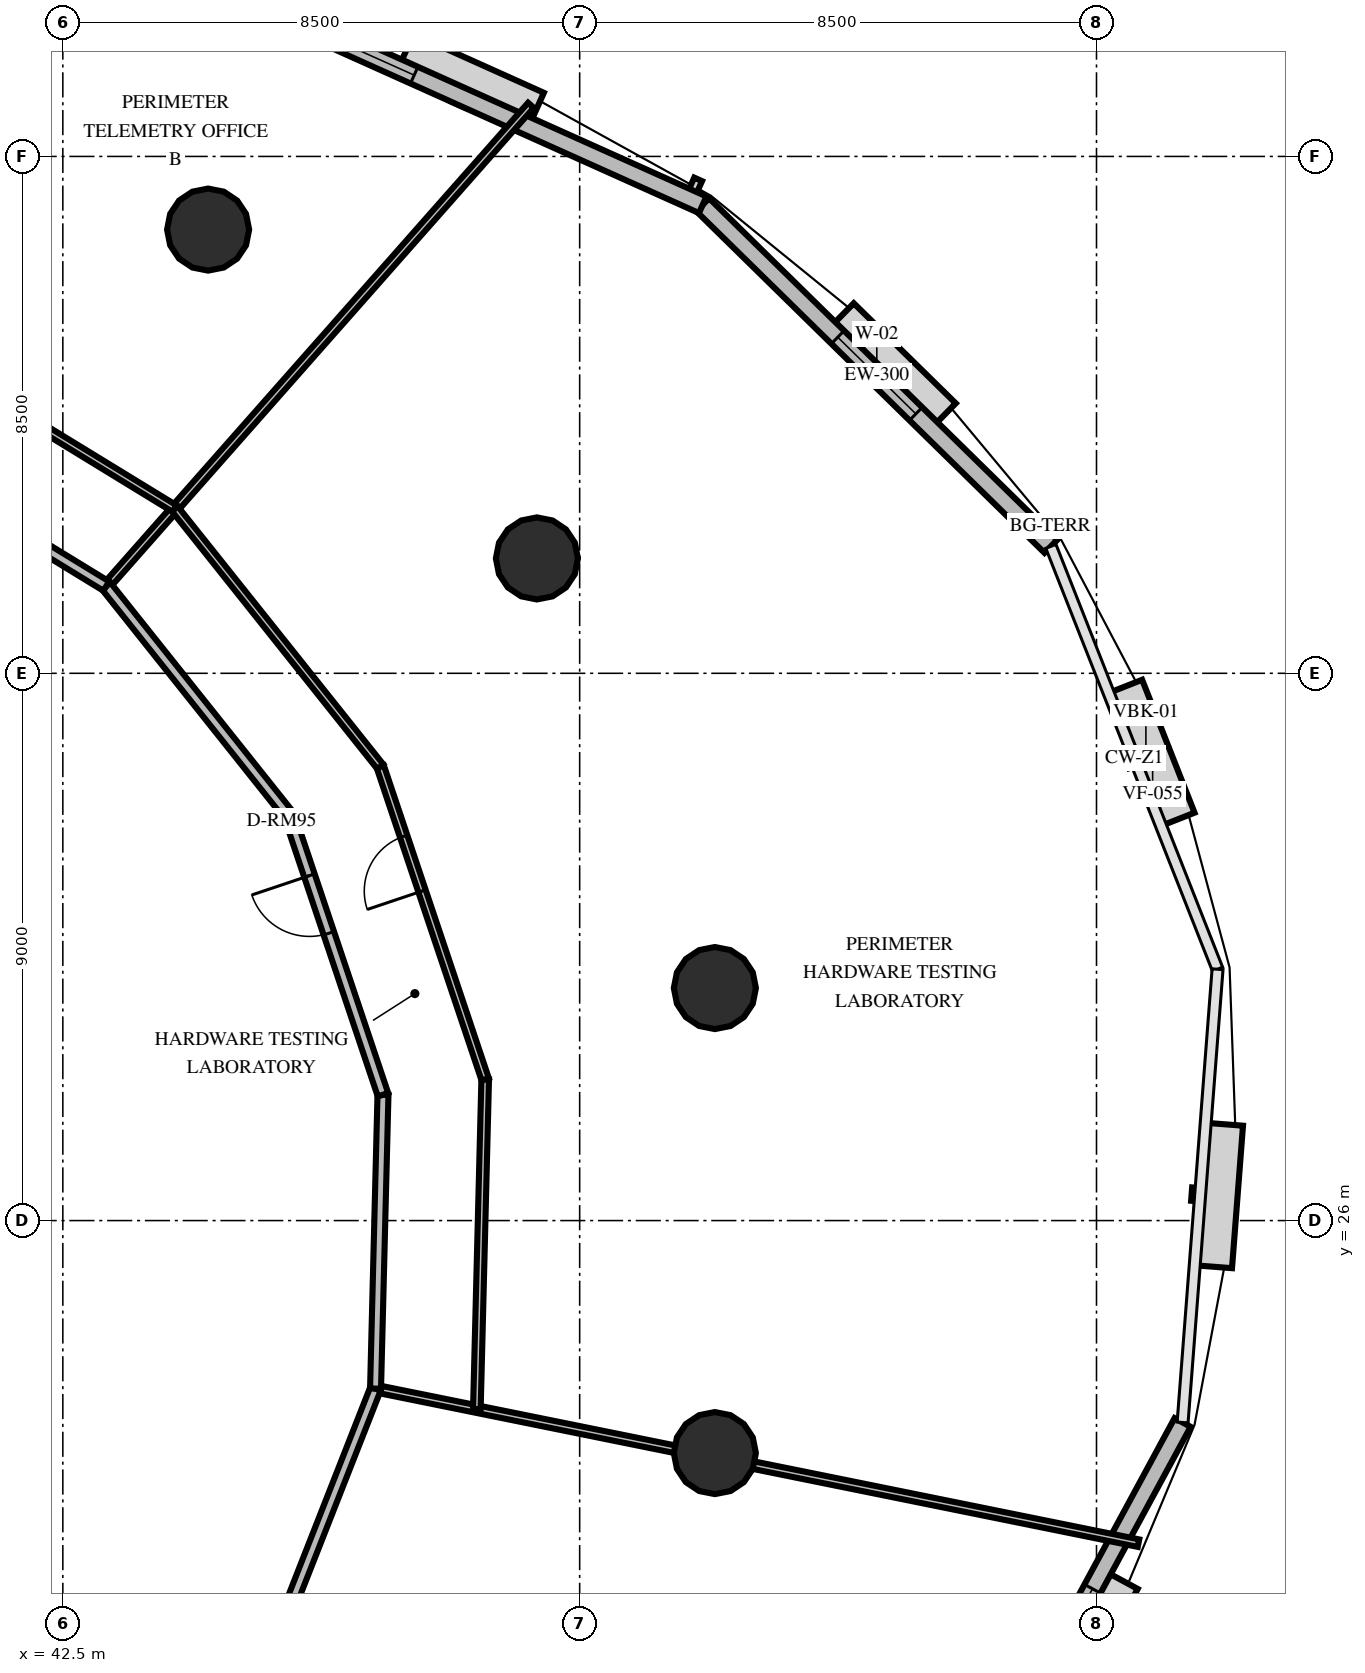
"""IFC4 building model, lengths in metres.
Left out: names, types, materials, properties, quantities, classifications, styles, units other than length and angle.
Written with IfcOpenShell. Run it as: python <this file> out.ifc"""

import sys

from ifc_helpers import new_model, si_unit, direction, frame, frame_2d, origin, origin_2d, place, context, subcontext, project, spatial, rectangle, circle, extrude, element, fill, save


model = new_model("IFC4")
c1 = context("Model", 3, precision=1e-05, world=origin(), true_north=direction((0.0, 1.0)))
c2 = subcontext(c1, "Body", "Model", "MODEL_VIEW")
j1 = project(units=[si_unit("LENGTHUNIT", "METRE"), si_unit("PLANEANGLEUNIT", "RADIAN")], contexts=[c1])
p1 = place(None, origin())
s1 = spatial("IfcSite", under=j1, at=p1, CompositionType="ELEMENT")
p2 = place(p1, origin())
s2 = spatial("IfcBuilding", under=s1, at=p2, CompositionType="ELEMENT")
p3 = place(p2, frame((0.0, 0.0, 67.8)))
s3 = spatial("IfcBuildingStorey", under=s2, at=p3, CompositionType="ELEMENT", Elevation=67.8)
for number, where, z_axis, x_axis in (
    (1, (53.223, 29.824, 0.0), (0.0, 0.0, 1.0), (1.0, 0.0, 0.0)),
    (2, (50.297, 36.889, 0.0), (0.0, 0.0, 1.0), (1.0, 0.0, 0.0)),
    (3, (44.889, 42.297, 0.0), (0.0, 0.0, 1.0), (1.0, 0.0, 0.0)),
    (4, (53.223, 22.176, 0.0), (0.0, 0.0, 1.0), (1.0, 0.0, 0.0)),
):
    element("IfcColumn", number, at=place(p3, frame(where, z_axis=z_axis, x_axis=x_axis)), inside=s3, PredefinedType="COLUMN", context=c2, shape_type="SweptSolid", body=[
        extrude(circle(Radius=0.675, at=origin_2d()), origin(), (0.0, 0.0, 1.0), 4.2),
    ])
p4 = place(p3, frame((58.75, 37.088, 0.0), z_axis=(0.0, 0.0, 1.0), x_axis=(-0.713861292458, 0.70028712335, 0.0)))
e5 = element("IfcWall", 5, at=p4, inside=s3, PredefinedType="SOLIDWALL", context=c2, shape_type="SweptSolid", body=[
    extrude(rectangle(XDim=8.022, YDim=0.3, at=frame_2d((4.011, 0.0))), origin(), (0.0, 0.0, 1.0), 3.0),
])
p5 = place(p4, frame((3.111, 0.0, 0.8)))
e6 = element("IfcOpeningElement", 6, at=p5, cuts=e5, PredefinedType="OPENING", context=c2, shape_type="SweptSolid", body=[
    extrude(rectangle(XDim=1.8, YDim=1.95, at=frame_2d((0.9, 0.975))), frame((0.0, 0.16, 0.0), z_axis=(0.0, -1.0, 0.0), x_axis=(1.0, 0.0, 0.0)), (0.0, 0.0, 1.0), 0.32),
])
p6 = place(p3, frame((53.024, 42.705, 0.0), z_axis=(0.0, 0.0, 1.0), x_axis=(-0.912205999873, 0.409731880376, 0.0)))
e7 = element("IfcWall", 7, at=p6, inside=s3, PredefinedType="SOLIDWALL", context=c2, shape_type="SweptSolid", body=[
    extrude(rectangle(XDim=8.792, YDim=0.3, at=frame_2d((4.396, 0.0))), origin(), (0.0, 0.0, 1.0), 3.0),
])
p7 = place(p6, frame((5.202, 0.0, 0.8)))
e8 = element("IfcOpeningElement", 8, at=p7, cuts=e7, PredefinedType="OPENING", context=c2, shape_type="SweptSolid", body=[
    extrude(rectangle(XDim=1.8, YDim=1.95, at=frame_2d((0.9, 0.975))), frame((0.0, 0.16, 0.0), z_axis=(0.0, -1.0, 0.0), x_axis=(1.0, 0.0, 0.0)), (0.0, 0.0, 1.0), 0.32),
])
p8 = place(p3, frame((57.095, 15.627, 0.0), z_axis=(0.0, 0.0, 1.0), x_axis=(0.476385116332, 0.879236726336, 0.0)))
e9 = element("IfcWall", 9, at=p8, inside=s3, PredefinedType="SOLIDWALL", context=c2, shape_type="SweptSolid", body=[
    extrude(rectangle(XDim=8.021, YDim=0.3, at=frame_2d((4.011, 0.0))), origin(), (0.0, 0.0, 1.0), 3.0),
])
p9 = place(p8, frame((3.111, 0.0, 0.8)))
e10 = element("IfcOpeningElement", 10, at=p9, cuts=e9, PredefinedType="OPENING", context=c2, shape_type="SweptSolid", body=[
    extrude(rectangle(XDim=1.8, YDim=1.95, at=frame_2d((0.9, 0.975))), frame((0.0, 0.16, 0.0), z_axis=(0.0, -1.0, 0.0), x_axis=(1.0, 0.0, 0.0)), (0.0, 0.0, 1.0), 0.32),
])
p10 = place(p3, frame((47.643, 23.237, 0.0), z_axis=(0.0, 0.0, 1.0), x_axis=(0.980096567328, -0.19852133062, 0.0)))
e11 = element("IfcWall", 11, at=p10, inside=s3, PredefinedType="PARTITIONING", context=c2, shape_type="SweptSolid", body=[
    extrude(rectangle(XDim=12.802, YDim=0.125, at=frame_2d((6.401, 0.0))), origin(), (0.0, 0.0, 1.0), 3.0),
])
p11 = place(p3, frame((45.875, 18.737, 0.0), z_axis=(0.0, 0.0, 1.0), x_axis=(0.365724243793, 0.930723255056, 0.0)))
e12 = element("IfcWall", 12, at=p11, inside=s3, PredefinedType="PARTITIONING", context=c2, shape_type="SweptSolid", body=[
    extrude(rectangle(XDim=4.834, YDim=0.18, at=frame_2d((2.417, 0.0))), origin(), (0.0, 0.0, 1.0), 3.0),
])
p12 = place(p3, frame((43.215, 36.434, 0.0), z_axis=(0.0, 0.0, 1.0), x_axis=(0.66196750906, 0.749532532282, 0.0)))
e13 = element("IfcWall", 13, at=p12, inside=s3, PredefinedType="PARTITIONING", context=c2, shape_type="SweptSolid", body=[
    extrude(rectangle(XDim=10.55, YDim=0.125, at=frame_2d((5.275, 0.0))), origin(), (0.0, 0.0, 1.0), 3.0),
])
p13 = place(p3, frame((47.643, 23.237, 0.0), z_axis=(0.0, 0.0, 1.0), x_axis=(0.025301319276, 0.99967987038, 0.0)))
e14 = element("IfcWall", 14, at=p13, inside=s3, PredefinedType="PARTITIONING", context=c2, shape_type="SweptSolid", body=[
    extrude(rectangle(XDim=4.834, YDim=0.18, at=frame_2d((2.417, 0.0))), origin(), (0.0, 0.0, 1.0), 3.0),
])
p14 = place(p3, frame((47.765, 28.07, 0.0), z_axis=(0.0, 0.0, 1.0), x_axis=(-0.31816640529, 0.948034882557, 0.0)))
e15 = element("IfcWall", 15, at=p14, inside=s3, PredefinedType="PARTITIONING", context=c2, shape_type="SweptSolid", body=[
    extrude(rectangle(XDim=4.834, YDim=0.18, at=frame_2d((2.417, 0.0))), origin(), (0.0, 0.0, 1.0), 3.0),
])
p15 = place(p14, frame((2.801, 0.0, 0.0)))
e16 = element("IfcOpeningElement", 16, at=p15, cuts=e15, PredefinedType="OPENING", context=c2, shape_type="SweptSolid", body=[
    extrude(rectangle(XDim=1.0, YDim=2.15, at=frame_2d((0.5, 1.075))), frame((0.0, 0.1, 0.0), z_axis=(0.0, -1.0, 0.0), x_axis=(1.0, 0.0, 0.0)), (0.0, 0.0, 1.0), 0.2),
])
p16 = place(p3, frame((46.227, 32.653, 0.0), z_axis=(0.0, 0.0, 1.0), x_axis=(-0.623166544039, 0.782089162685, 0.0)))
e17 = element("IfcWall", 17, at=p16, inside=s3, PredefinedType="PARTITIONING", context=c2, shape_type="SweptSolid", body=[
    extrude(rectangle(XDim=4.834, YDim=0.18, at=frame_2d((2.417, 0.0))), origin(), (0.0, 0.0, 1.0), 3.0),
])
p17 = place(p3, frame((49.309, 22.899, 0.0), z_axis=(0.0, 0.0, 1.0), x_axis=(0.025292405975, 0.999680095931, 0.0)))
e18 = element("IfcWall", 18, at=p17, inside=s3, PredefinedType="PARTITIONING", context=c2, shape_type="SweptSolid", body=[
    extrude(rectangle(XDim=5.425, YDim=0.125, at=frame_2d((2.712, 0.0))), origin(), (0.0, 0.0, 1.0), 3.0),
])
p18 = place(p3, frame((49.446, 28.322, 0.0), z_axis=(0.0, 0.0, 1.0), x_axis=(-0.318103906264, 0.948055855327, 0.0)))
e19 = element("IfcWall", 19, at=p18, inside=s3, PredefinedType="PARTITIONING", context=c2, shape_type="SweptSolid", body=[
    extrude(rectangle(XDim=5.425, YDim=0.125, at=frame_2d((2.712, 0.0))), origin(), (0.0, 0.0, 1.0), 3.0),
])
p19 = place(p18, frame((3.266, 0.0, 0.0)))
e20 = element("IfcOpeningElement", 20, at=p19, cuts=e19, PredefinedType="OPENING", context=c2, shape_type="SweptSolid", body=[
    extrude(rectangle(XDim=0.95, YDim=2.15, at=frame_2d((0.475, 1.075))), frame((0.0, 0.073, 0.0), z_axis=(0.0, -1.0, 0.0), x_axis=(1.0, 0.0, 0.0)), (0.0, 0.0, 1.0), 0.145),
])
p20 = place(p3, frame((47.721, 33.465, 0.0), z_axis=(0.0, 0.0, 1.0), x_axis=(-0.623201124623, 0.782061607719, 0.0)))
e21 = element("IfcWall", 21, at=p20, inside=s3, PredefinedType="PARTITIONING", context=c2, shape_type="SweptSolid", body=[
    extrude(rectangle(XDim=5.425, YDim=0.125, at=frame_2d((2.712, 0.0))), origin(), (0.0, 0.0, 1.0), 3.0),
])
p21 = place(p3, frame((43.215, 36.434, 0.0), z_axis=(0.0, 0.0, 1.0), x_axis=(-0.853113263306, 0.521725751685, 0.0)))
e22 = element("IfcWall", 22, at=p21, inside=s3, PredefinedType="PARTITIONING", context=c2, shape_type="SweptSolid", body=[
    extrude(rectangle(XDim=4.834, YDim=0.18, at=frame_2d((2.417, 0.0))), origin(), (0.0, 0.0, 1.0), 3.0),
])
p22 = place(p3, frame((44.34, 37.708, 0.0), z_axis=(0.0, 0.0, 1.0), x_axis=(-0.853093763248, 0.521757636367, 0.0)))
e23 = element("IfcWall", 23, at=p22, inside=s3, PredefinedType="PARTITIONING", context=c2, shape_type="SweptSolid", body=[
    extrude(rectangle(XDim=5.425, YDim=0.125, at=frame_2d((2.712, 0.0))), origin(), (0.0, 0.0, 1.0), 3.0),
])
p23 = place(p5, origin())
e24 = element("IfcWindow", 24, at=p23, inside=s3, PartitioningType="SINGLE_PANEL", PredefinedType="WINDOW", context=c2, shape_type="SweptSolid", body=[
    extrude(rectangle(XDim=1.8, YDim=1.95, at=frame_2d((0.9, 0.975))), frame((0.0, 0.03, 0.0), z_axis=(0.0, -1.0, 0.0), x_axis=(1.0, 0.0, 0.0)), (0.0, 0.0, 1.0), 0.06),
])
fill(e6, e24)
p24 = place(p7, origin())
e25 = element("IfcWindow", 25, at=p24, inside=s3, PartitioningType="SINGLE_PANEL", PredefinedType="WINDOW", context=c2, shape_type="SweptSolid", body=[
    extrude(rectangle(XDim=1.8, YDim=1.95, at=frame_2d((0.9, 0.975))), frame((0.0, 0.03, 0.0), z_axis=(0.0, -1.0, 0.0), x_axis=(1.0, 0.0, 0.0)), (0.0, 0.0, 1.0), 0.06),
])
fill(e8, e25)
p25 = place(p9, origin())
e26 = element("IfcWindow", 26, at=p25, inside=s3, PartitioningType="SINGLE_PANEL", PredefinedType="WINDOW", context=c2, shape_type="SweptSolid", body=[
    extrude(rectangle(XDim=1.8, YDim=1.95, at=frame_2d((0.9, 0.975))), frame((0.0, 0.03, 0.0), z_axis=(0.0, -1.0, 0.0), x_axis=(1.0, 0.0, 0.0)), (0.0, 0.0, 1.0), 0.06),
])
fill(e10, e26)
p26 = place(p15, origin())
e27 = element("IfcDoor", 27, at=p26, inside=s3, OperationType="SINGLE_SWING_RIGHT", PredefinedType="DOOR", context=c2, shape_type="SweptSolid", body=[
    extrude(rectangle(XDim=1.0, YDim=2.15, at=frame_2d((0.5, 1.075))), frame((0.0, 0.025, 0.0), z_axis=(0.0, -1.0, 0.0), x_axis=(1.0, 0.0, 0.0)), (0.0, 0.0, 1.0), 0.05),
])
fill(e16, e27)
p27 = place(p19, origin())
e28 = element("IfcDoor", 28, at=p27, inside=s3, OperationType="SINGLE_SWING_LEFT", PredefinedType="DOOR", context=c2, shape_type="SweptSolid", body=[
    extrude(rectangle(XDim=0.95, YDim=2.15, at=frame_2d((0.475, 1.075))), frame((0.0, 0.025, 0.0), z_axis=(0.0, -1.0, 0.0), x_axis=(1.0, 0.0, 0.0)), (0.0, 0.0, 1.0), 0.05),
])
fill(e20, e28)
save(model, sys.argv[1])
